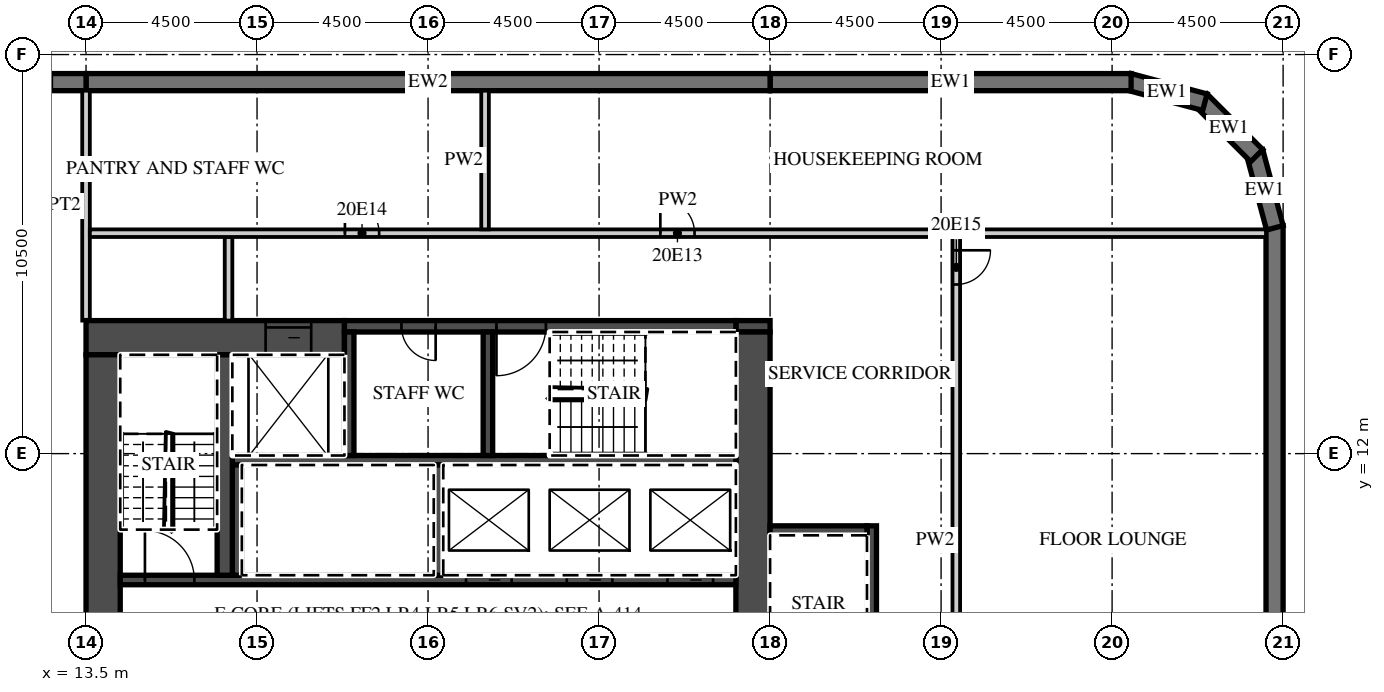
"""IFC4 building model, lengths in metres.
Left out: names, types, materials, properties, quantities, classifications, styles, units other than length and angle.
Written with IfcOpenShell. Run it as: python <this file> out.ifc"""

import sys

from ifc_helpers import new_model, si_unit, direction, frame, frame_2d, origin, place, context, subcontext, project, spatial, polyline, rectangle, outline, extrude, element, fill, save


model = new_model("IFC4")
c1 = context("Model", 3, precision=1e-05, world=origin(), true_north=direction((0.0, 1.0)))
c2 = subcontext(c1, "Body", "Model", "MODEL_VIEW")
j1 = project(units=[si_unit("LENGTHUNIT", "METRE"), si_unit("PLANEANGLEUNIT", "RADIAN")], contexts=[c1])
p1 = place(None, origin())
s1 = spatial("IfcSite", under=j1, at=p1, CompositionType="ELEMENT")
p2 = place(p1, origin())
s2 = spatial("IfcBuilding", under=s1, at=p2, CompositionType="ELEMENT")
p3 = place(p2, frame((0.0, 0.0, 96.3)))
s3 = spatial("IfcBuildingStorey", under=s2, at=p3, CompositionType="ELEMENT", Elevation=96.3)
p4 = place(p3, frame((44.775, -18.0, 0.0), z_axis=(0.0, 0.0, 1.0), x_axis=(0.0, 1.0, 0.0)))
e1 = element("IfcWall", 1, at=p4, inside=s3, PredefinedType="SOLIDWALL", context=c2, shape_type="SweptSolid", body=[
    extrude(rectangle(XDim=36.0, YDim=0.45, at=frame_2d((18.0, 0.0))), origin(), (0.0, 0.0, 1.0), 3.0),
])
p5 = place(p4, frame((3.9, 0.0, 0.45)))
e2 = element("IfcOpeningElement", 2, at=p5, cuts=e1, PredefinedType="OPENING", context=c2, shape_type="SweptSolid", body=[
    extrude(rectangle(XDim=3.3, YDim=2.25, at=frame_2d((1.65, 1.125))), frame((0.0, 0.235, 0.0), z_axis=(0.0, -1.0, 0.0), x_axis=(1.0, 0.0, 0.0)), (0.0, 0.0, 1.0), 0.47),
])
p6 = place(p4, frame((8.4, 0.0, 0.45)))
e3 = element("IfcOpeningElement", 3, at=p6, cuts=e1, PredefinedType="OPENING", context=c2, shape_type="SweptSolid", body=[
    extrude(rectangle(XDim=3.3, YDim=2.25, at=frame_2d((1.65, 1.125))), frame((0.0, 0.235, 0.0), z_axis=(0.0, -1.0, 0.0), x_axis=(1.0, 0.0, 0.0)), (0.0, 0.0, 1.0), 0.47),
])
p7 = place(p4, frame((12.9, 0.0, 0.45)))
e4 = element("IfcOpeningElement", 4, at=p7, cuts=e1, PredefinedType="OPENING", context=c2, shape_type="SweptSolid", body=[
    extrude(rectangle(XDim=3.3, YDim=2.25, at=frame_2d((1.65, 1.125))), frame((0.0, 0.235, 0.0), z_axis=(0.0, -1.0, 0.0), x_axis=(1.0, 0.0, 0.0)), (0.0, 0.0, 1.0), 0.47),
])
p8 = place(p3, frame((44.783, 17.942, 0.0), z_axis=(0.0, 0.0, 1.0), x_axis=(-0.25881466832, 0.965926999034, 0.0)))
e5 = element("IfcWall", 5, at=p8, inside=s3, PredefinedType="SOLIDWALL", context=c2, shape_type="SweptSolid", body=[
    extrude(outline(polyline([(0.0, -0.225), (2.071, -0.225), (1.95, 0.225), (0.121, 0.225), (0.0, -0.225)])), origin(), (0.0, 0.0, 1.0), 3.0),
])
p9 = place(p3, frame((44.305, 19.841, 0.0), z_axis=(0.0, 0.0, 1.0), x_axis=(-0.707106781187, 0.707106781187, 0.0)))
e6 = element("IfcWall", 6, at=p9, inside=s3, PredefinedType="SOLIDWALL", context=c2, shape_type="SweptSolid", body=[
    extrude(outline(polyline([(0.0, -0.225), (2.071, -0.225), (1.95, 0.225), (0.121, 0.225), (0.0, -0.225)])), origin(), (0.0, 0.0, 1.0), 3.0),
])
p10 = place(p3, frame((42.942, 21.247, 0.0), z_axis=(0.0, 0.0, 1.0), x_axis=(-0.965926999034, 0.25881466832, 0.0)))
e7 = element("IfcWall", 7, at=p10, inside=s3, PredefinedType="SOLIDWALL", context=c2, shape_type="SweptSolid", body=[
    extrude(outline(polyline([(-0.0, -0.225), (2.07, -0.225), (1.95, 0.225), (0.12, 0.225), (-0.0, -0.225)])), origin(), (0.0, 0.0, 1.0), 3.0),
])
p11 = place(p3, frame((41.0, 21.775, 0.0), z_axis=(0.0, 0.0, 1.0), x_axis=(-1.0, 0.0, 0.0)))
e8 = element("IfcWall", 8, at=p11, inside=s3, PredefinedType="SOLIDWALL", context=c2, shape_type="SweptSolid", body=[
    extrude(rectangle(XDim=9.5, YDim=0.45, at=frame_2d((4.75, 0.0))), origin(), (0.0, 0.0, 1.0), 3.0),
])
p12 = place(p3, frame((31.5, 21.775, 0.0), z_axis=(0.0, 0.0, 1.0), x_axis=(-1.0, 0.0, 0.0)))
e9 = element("IfcWall", 9, at=p12, inside=s3, PredefinedType="SOLIDWALL", context=c2, shape_type="SweptSolid", body=[
    extrude(rectangle(XDim=18.0, YDim=0.45, at=frame_2d((9.0, 0.0))), origin(), (0.0, 0.0, 1.0), 3.0),
])
p13 = place(p3, frame((13.5, 21.775, 0.0), z_axis=(0.0, 0.0, 1.0), x_axis=(-1.0, 0.0, 0.0)))
e10 = element("IfcWall", 10, at=p13, inside=s3, PredefinedType="SOLIDWALL", context=c2, shape_type="SweptSolid", body=[
    extrude(rectangle(XDim=54.5, YDim=0.45, at=frame_2d((27.25, 0.0))), origin(), (0.0, 0.0, 1.0), 3.0),
])
p14 = place(p13, frame((0.9, 0.0, 0.45)))
e11 = element("IfcOpeningElement", 11, at=p14, cuts=e10, PredefinedType="OPENING", context=c2, shape_type="SweptSolid", body=[
    extrude(rectangle(XDim=2.7, YDim=2.25, at=frame_2d((1.35, 1.125))), frame((0.0, 0.235, 0.0), z_axis=(0.0, -1.0, 0.0), x_axis=(1.0, 0.0, 0.0)), (0.0, 0.0, 1.0), 0.47),
])
p15 = place(p13, frame((5.4, 0.0, 0.45)))
e12 = element("IfcOpeningElement", 12, at=p15, cuts=e10, PredefinedType="OPENING", context=c2, shape_type="SweptSolid", body=[
    extrude(rectangle(XDim=2.7, YDim=2.25, at=frame_2d((1.35, 1.125))), frame((0.0, 0.235, 0.0), z_axis=(0.0, -1.0, 0.0), x_axis=(1.0, 0.0, 0.0)), (0.0, 0.0, 1.0), 0.47),
])
p16 = place(p13, frame((9.9, 0.0, 0.45)))
e13 = element("IfcOpeningElement", 13, at=p16, cuts=e10, PredefinedType="OPENING", context=c2, shape_type="SweptSolid", body=[
    extrude(rectangle(XDim=2.7, YDim=2.25, at=frame_2d((1.35, 1.125))), frame((0.0, 0.235, 0.0), z_axis=(0.0, -1.0, 0.0), x_axis=(1.0, 0.0, 0.0)), (0.0, 0.0, 1.0), 0.47),
])
p17 = place(p13, frame((14.4, 0.0, 0.45)))
e14 = element("IfcOpeningElement", 14, at=p17, cuts=e10, PredefinedType="OPENING", context=c2, shape_type="SweptSolid", body=[
    extrude(rectangle(XDim=2.7, YDim=2.25, at=frame_2d((1.35, 1.125))), frame((0.0, 0.235, 0.0), z_axis=(0.0, -1.0, 0.0), x_axis=(1.0, 0.0, 0.0)), (0.0, 0.0, 1.0), 0.47),
])
p18 = place(p13, frame((18.9, 0.0, 0.45)))
e15 = element("IfcOpeningElement", 15, at=p18, cuts=e10, PredefinedType="OPENING", context=c2, shape_type="SweptSolid", body=[
    extrude(rectangle(XDim=2.7, YDim=2.25, at=frame_2d((1.35, 1.125))), frame((0.0, 0.235, 0.0), z_axis=(0.0, -1.0, 0.0), x_axis=(1.0, 0.0, 0.0)), (0.0, 0.0, 1.0), 0.47),
])
p19 = place(p13, frame((23.4, 0.0, 0.45)))
e16 = element("IfcOpeningElement", 16, at=p19, cuts=e10, PredefinedType="OPENING", context=c2, shape_type="SweptSolid", body=[
    extrude(rectangle(XDim=2.7, YDim=2.25, at=frame_2d((1.35, 1.125))), frame((0.0, 0.235, 0.0), z_axis=(0.0, -1.0, 0.0), x_axis=(1.0, 0.0, 0.0)), (0.0, 0.0, 1.0), 0.47),
])
p20 = place(p13, frame((27.9, 0.0, 0.45)))
e17 = element("IfcOpeningElement", 17, at=p20, cuts=e10, PredefinedType="OPENING", context=c2, shape_type="SweptSolid", body=[
    extrude(rectangle(XDim=2.7, YDim=2.25, at=frame_2d((1.35, 1.125))), frame((0.0, 0.235, 0.0), z_axis=(0.0, -1.0, 0.0), x_axis=(1.0, 0.0, 0.0)), (0.0, 0.0, 1.0), 0.47),
])
p21 = place(p13, frame((32.4, 0.0, 0.45)))
e18 = element("IfcOpeningElement", 18, at=p21, cuts=e10, PredefinedType="OPENING", context=c2, shape_type="SweptSolid", body=[
    extrude(rectangle(XDim=2.7, YDim=2.25, at=frame_2d((1.35, 1.125))), frame((0.0, 0.235, 0.0), z_axis=(0.0, -1.0, 0.0), x_axis=(1.0, 0.0, 0.0)), (0.0, 0.0, 1.0), 0.47),
])
p22 = place(p13, frame((36.9, 0.0, 0.45)))
e19 = element("IfcOpeningElement", 19, at=p22, cuts=e10, PredefinedType="OPENING", context=c2, shape_type="SweptSolid", body=[
    extrude(rectangle(XDim=2.7, YDim=2.25, at=frame_2d((1.35, 1.125))), frame((0.0, 0.235, 0.0), z_axis=(0.0, -1.0, 0.0), x_axis=(1.0, 0.0, 0.0)), (0.0, 0.0, 1.0), 0.47),
])
p23 = place(p13, frame((41.4, 0.0, 0.45)))
e20 = element("IfcOpeningElement", 20, at=p23, cuts=e10, PredefinedType="OPENING", context=c2, shape_type="SweptSolid", body=[
    extrude(rectangle(XDim=2.7, YDim=2.25, at=frame_2d((1.35, 1.125))), frame((0.0, 0.235, 0.0), z_axis=(0.0, -1.0, 0.0), x_axis=(1.0, 0.0, 0.0)), (0.0, 0.0, 1.0), 0.47),
])
p24 = place(p13, frame((45.9, 0.0, 0.45)))
e21 = element("IfcOpeningElement", 21, at=p24, cuts=e10, PredefinedType="OPENING", context=c2, shape_type="SweptSolid", body=[
    extrude(rectangle(XDim=2.7, YDim=2.25, at=frame_2d((1.35, 1.125))), frame((0.0, 0.235, 0.0), z_axis=(0.0, -1.0, 0.0), x_axis=(1.0, 0.0, 0.0)), (0.0, 0.0, 1.0), 0.47),
])
p25 = place(p13, frame((50.4, 0.0, 0.45)))
e22 = element("IfcOpeningElement", 22, at=p25, cuts=e10, PredefinedType="OPENING", context=c2, shape_type="SweptSolid", body=[
    extrude(rectangle(XDim=2.7, YDim=2.25, at=frame_2d((1.35, 1.125))), frame((0.0, 0.235, 0.0), z_axis=(0.0, -1.0, 0.0), x_axis=(1.0, 0.0, 0.0)), (0.0, 0.0, 1.0), 0.47),
])
p26 = place(p3, frame((13.5, 15.5, 0.0), z_axis=(0.0, 0.0, 1.0), x_axis=(0.0, 1.0, 0.0)))
e23 = element("IfcWall", 23, at=p26, inside=s3, PredefinedType="PARTITIONING", context=c2, shape_type="SweptSolid", body=[
    extrude(rectangle(XDim=6.05, YDim=0.2, at=frame_2d((3.025, 0.0))), origin(), (0.0, 0.0, 1.0), 3.0),
])
p27 = place(p3, frame((13.5, 15.05, 0.0), z_axis=(0.0, 0.0, 1.0), x_axis=(1.0, 0.0, 0.0)))
e24 = element("IfcWall", 24, at=p27, inside=s3, PredefinedType="SHEAR", context=c2, shape_type="SweptSolid", body=[
    extrude(rectangle(XDim=6.8, YDim=0.9, at=frame_2d((3.4, 0.0))), origin(), (0.0, 0.0, 1.0), 3.0),
])
p28 = place(p27, frame((4.725, 0.0, 0.0)))
e25 = element("IfcOpeningElement", 25, at=p28, cuts=e24, PredefinedType="OPENING", context=c2, shape_type="SweptSolid", body=[
    extrude(rectangle(XDim=1.2, YDim=2.1, at=frame_2d((0.6, 1.05))), frame((0.0, 0.46, 0.0), z_axis=(0.0, -1.0, 0.0), x_axis=(1.0, 0.0, 0.0)), (0.0, 0.0, 1.0), 0.92),
])
p29 = place(p3, frame((30.6, 15.35, 0.0), z_axis=(0.0, 0.0, 1.0), x_axis=(1.0, 0.0, 0.0)))
e26 = element("IfcWall", 26, at=p29, inside=s3, PredefinedType="SHEAR", context=c2, shape_type="SweptSolid", body=[
    extrude(rectangle(XDim=0.9, YDim=0.3, at=frame_2d((0.45, 0.0))), origin(), (0.0, 0.0, 1.0), 3.0),
])
p30 = place(p3, frame((20.3, 15.35, 0.0), z_axis=(0.0, 0.0, 1.0), x_axis=(1.0, 0.0, 0.0)))
e27 = element("IfcWall", 27, at=p30, inside=s3, PredefinedType="SHEAR", context=c2, shape_type="SweptSolid", body=[
    extrude(rectangle(XDim=10.3, YDim=0.3, at=frame_2d((5.15, 0.0))), origin(), (0.0, 0.0, 1.0), 3.0),
])
p31 = place(p30, frame((4.0, 0.0, 0.0)))
e28 = element("IfcOpeningElement", 28, at=p31, cuts=e27, PredefinedType="OPENING", context=c2, shape_type="SweptSolid", body=[
    extrude(rectangle(XDim=1.3, YDim=2.1, at=frame_2d((0.65, 1.05))), frame((0.0, 0.16, 0.0), z_axis=(0.0, -1.0, 0.0), x_axis=(1.0, 0.0, 0.0)), (0.0, 0.0, 1.0), 0.32),
])
p32 = place(p30, frame((1.5, 0.0, 0.0)))
e29 = element("IfcOpeningElement", 29, at=p32, cuts=e27, PredefinedType="OPENING", context=c2, shape_type="SweptSolid", body=[
    extrude(rectangle(XDim=0.9, YDim=2.1, at=frame_2d((0.45, 1.05))), frame((0.0, 0.16, 0.0), z_axis=(0.0, -1.0, 0.0), x_axis=(1.0, 0.0, 0.0)), (0.0, 0.0, 1.0), 0.32),
])
p33 = place(p3, frame((31.05, 2.4, 0.0), z_axis=(0.0, 0.0, 1.0), x_axis=(0.0, 1.0, 0.0)))
e30 = element("IfcWall", 30, at=p33, inside=s3, PredefinedType="SHEAR", context=c2, shape_type="SweptSolid", body=[
    extrude(rectangle(XDim=12.8, YDim=0.9, at=frame_2d((6.4, 0.0))), origin(), (0.0, 0.0, 1.0), 3.0),
])
p34 = place(p33, frame((0.2, 0.0, 0.0)))
e31 = element("IfcOpeningElement", 31, at=p34, cuts=e30, PredefinedType="OPENING", context=c2, shape_type="SweptSolid", body=[
    extrude(rectangle(XDim=1.1, YDim=2.1, at=frame_2d((0.55, 1.05))), frame((0.0, 0.46, 0.0), z_axis=(0.0, -1.0, 0.0), x_axis=(1.0, 0.0, 0.0)), (0.0, 0.0, 1.0), 0.92),
])
p35 = place(p3, frame((13.95, 2.4, 0.0), z_axis=(0.0, 0.0, 1.0), x_axis=(0.0, 1.0, 0.0)))
e32 = element("IfcWall", 32, at=p35, inside=s3, PredefinedType="SHEAR", context=c2, shape_type="SweptSolid", body=[
    extrude(rectangle(XDim=12.2, YDim=0.9, at=frame_2d((6.1, 0.0))), origin(), (0.0, 0.0, 1.0), 3.0),
])
p36 = place(p3, frame((14.4, 8.675, 0.0), z_axis=(0.0, 0.0, 1.0), x_axis=(1.0, 0.0, 0.0)))
e33 = element("IfcWall", 33, at=p36, inside=s3, PredefinedType="SHEAR", context=c2, shape_type="SweptSolid", body=[
    extrude(rectangle(XDim=16.2, YDim=0.25, at=frame_2d((8.1, 0.0))), origin(), (0.0, 0.0, 1.0), 3.0),
])
p37 = place(p36, frame((14.4, 0.0, 0.0)))
e34 = element("IfcOpeningElement", 34, at=p37, cuts=e33, PredefinedType="OPENING", context=c2, shape_type="SweptSolid", body=[
    extrude(rectangle(XDim=1.2, YDim=2.1, at=frame_2d((0.6, 1.05))), frame((0.0, 0.135, 0.0), z_axis=(0.0, -1.0, 0.0), x_axis=(1.0, 0.0, 0.0)), (0.0, 0.0, 1.0), 0.27),
])
p38 = place(p36, frame((11.75, 0.0, 0.0)))
e35 = element("IfcOpeningElement", 35, at=p38, cuts=e33, PredefinedType="OPENING", context=c2, shape_type="SweptSolid", body=[
    extrude(rectangle(XDim=1.2, YDim=2.1, at=frame_2d((0.6, 1.05))), frame((0.0, 0.135, 0.0), z_axis=(0.0, -1.0, 0.0), x_axis=(1.0, 0.0, 0.0)), (0.0, 0.0, 1.0), 0.27),
])
p39 = place(p36, frame((9.1, 0.0, 0.0)))
e36 = element("IfcOpeningElement", 36, at=p39, cuts=e33, PredefinedType="OPENING", context=c2, shape_type="SweptSolid", body=[
    extrude(rectangle(XDim=1.2, YDim=2.1, at=frame_2d((0.6, 1.05))), frame((0.0, 0.135, 0.0), z_axis=(0.0, -1.0, 0.0), x_axis=(1.0, 0.0, 0.0)), (0.0, 0.0, 1.0), 0.27),
])
p40 = place(p36, frame((0.65, 0.0, 0.0)))
e37 = element("IfcOpeningElement", 37, at=p40, cuts=e33, PredefinedType="OPENING", context=c2, shape_type="SweptSolid", body=[
    extrude(rectangle(XDim=1.3, YDim=2.1, at=frame_2d((0.65, 1.05))), frame((0.0, 0.135, 0.0), z_axis=(0.0, -1.0, 0.0), x_axis=(1.0, 0.0, 0.0)), (0.0, 0.0, 1.0), 0.27),
])
p41 = place(p3, frame((17.35, 11.825, 0.0), z_axis=(0.0, 0.0, 1.0), x_axis=(1.0, 0.0, 0.0)))
e38 = element("IfcWall", 38, at=p41, inside=s3, PredefinedType="SHEAR", context=c2, shape_type="SweptSolid", body=[
    extrude(rectangle(XDim=13.25, YDim=0.25, at=frame_2d((6.625, 0.0))), origin(), (0.0, 0.0, 1.0), 3.0),
])
for number, where, z_axis, x_axis in (
    (39, (17.475, 8.8, 0.0), (0.0, 0.0, 1.0), (0.0, 1.0, 0.0)),
    (40, (22.775, 8.8, 0.0), (0.0, 0.0, 1.0), (0.0, 1.0, 0.0)),
):
    element("IfcWall", number, at=place(p3, frame(where, z_axis=z_axis, x_axis=x_axis)), inside=s3, PredefinedType="SHEAR", context=c2, shape_type="SweptSolid", body=[
        extrude(rectangle(XDim=2.9, YDim=0.25, at=frame_2d((1.45, 0.0))), origin(), (0.0, 0.0, 1.0), 3.0),
    ])
p42 = place(p3, frame((17.15, 8.8, 0.0), z_axis=(0.0, 0.0, 1.0), x_axis=(0.0, 1.0, 0.0)))
e41 = element("IfcWall", 41, at=p42, inside=s3, PredefinedType="SHEAR", context=c2, shape_type="SweptSolid", body=[
    extrude(rectangle(XDim=5.8, YDim=0.4, at=frame_2d((2.9, 0.0))), origin(), (0.0, 0.0, 1.0), 3.0),
])
for number, where, z_axis, x_axis in (
    (42, (20.425, 11.95, 0.0), (0.0, 0.0, 1.0), (0.0, 1.0, 0.0)),
    (43, (24.075, 11.95, 0.0), (0.0, 0.0, 1.0), (0.0, 1.0, 0.0)),
):
    element("IfcWall", number, at=place(p3, frame(where, z_axis=z_axis, x_axis=x_axis)), inside=s3, PredefinedType="SHEAR", context=c2, shape_type="SweptSolid", body=[
        extrude(rectangle(XDim=3.25, YDim=0.25, at=frame_2d((1.625, 0.0))), origin(), (0.0, 0.0, 1.0), 3.0),
    ])
p43 = place(p3, frame((34.175, 1.75, 0.0), z_axis=(0.0, 0.0, 1.0), x_axis=(0.0, 1.0, 0.0)))
e44 = element("IfcWall", 44, at=p43, inside=s3, PredefinedType="SHEAR", context=c2, shape_type="SweptSolid", body=[
    extrude(rectangle(XDim=8.35, YDim=0.25, at=frame_2d((4.175, 0.0))), origin(), (0.0, 0.0, 1.0), 3.0),
])
p44 = place(p3, frame((31.5, 9.975, 0.0), z_axis=(0.0, 0.0, 1.0), x_axis=(1.0, 0.0, 0.0)))
e45 = element("IfcWall", 45, at=p44, inside=s3, PredefinedType="SHEAR", context=c2, shape_type="SweptSolid", body=[
    extrude(rectangle(XDim=2.55, YDim=0.25, at=frame_2d((1.275, 0.0))), origin(), (0.0, 0.0, 1.0), 3.0),
])
p45 = place(p3, frame((17.25, 15.5, 0.0), z_axis=(0.0, 0.0, 1.0), x_axis=(0.0, 1.0, 0.0)))
e46 = element("IfcWall", 46, at=p45, inside=s3, PredefinedType="PARTITIONING", context=c2, shape_type="SweptSolid", body=[
    extrude(rectangle(XDim=2.2, YDim=0.2, at=frame_2d((1.1, 0.0))), origin(), (0.0, 0.0, 1.0), 3.0),
])
p46 = place(p3, frame((36.4, 1.75, 0.0), z_axis=(0.0, 0.0, 1.0), x_axis=(0.0, 1.0, 0.0)))
e47 = element("IfcWall", 47, at=p46, inside=s3, PredefinedType="PARTITIONING", context=c2, shape_type="SweptSolid", body=[
    extrude(rectangle(XDim=15.95, YDim=0.2, at=frame_2d((7.975, 0.0))), origin(), (0.0, 0.0, 1.0), 3.0),
])
p47 = place(p46, frame((14.7, 0.0, 0.0)))
e48 = element("IfcOpeningElement", 48, at=p47, cuts=e47, PredefinedType="OPENING", context=c2, shape_type="SweptSolid", body=[
    extrude(rectangle(XDim=0.9, YDim=2.1, at=frame_2d((0.45, 1.05))), frame((0.0, 0.11, 0.0), z_axis=(0.0, -1.0, 0.0), x_axis=(1.0, 0.0, 0.0)), (0.0, 0.0, 1.0), 0.22),
])
p48 = place(p3, frame((13.6, 17.8, 0.0), z_axis=(0.0, 0.0, 1.0), x_axis=(1.0, 0.0, 0.0)))
e49 = element("IfcWall", 49, at=p48, inside=s3, PredefinedType="PARTITIONING", context=c2, shape_type="SweptSolid", body=[
    extrude(rectangle(XDim=30.95, YDim=0.2, at=frame_2d((15.475, 0.0))), origin(), (0.0, 0.0, 1.0), 3.0),
])
p49 = place(p48, frame((15.012, 0.0, 0.0)))
e50 = element("IfcOpeningElement", 50, at=p49, cuts=e49, PredefinedType="OPENING", context=c2, shape_type="SweptSolid", body=[
    extrude(rectangle(XDim=0.9, YDim=2.1, at=frame_2d((0.45, 1.05))), frame((0.0, 0.11, 0.0), z_axis=(0.0, -1.0, 0.0), x_axis=(1.0, 0.0, 0.0)), (0.0, 0.0, 1.0), 0.22),
])
p50 = place(p48, frame((6.712, 0.0, 0.0)))
e51 = element("IfcOpeningElement", 51, at=p50, cuts=e49, PredefinedType="OPENING", context=c2, shape_type="SweptSolid", body=[
    extrude(rectangle(XDim=0.9, YDim=2.1, at=frame_2d((0.45, 1.05))), frame((0.0, 0.11, 0.0), z_axis=(0.0, -1.0, 0.0), x_axis=(1.0, 0.0, 0.0)), (0.0, 0.0, 1.0), 0.22),
])
p51 = place(p3, frame((24.0, 17.9, 0.0), z_axis=(0.0, 0.0, 1.0), x_axis=(0.0, 1.0, 0.0)))
e52 = element("IfcWall", 52, at=p51, inside=s3, PredefinedType="PARTITIONING", context=c2, shape_type="SweptSolid", body=[
    extrude(rectangle(XDim=3.65, YDim=0.2, at=frame_2d((1.825, 0.0))), origin(), (0.0, 0.0, 1.0), 3.0),
])
p52 = place(p37, origin())
e53 = element("IfcDoor", 53, at=p52, inside=s3, OperationType="SLIDING_TO_LEFT", PredefinedType="DOOR", context=c2, shape_type="SweptSolid", body=[
    extrude(rectangle(XDim=1.2, YDim=2.1, at=frame_2d((0.6, 1.05))), frame((0.0, 0.025, 0.0), z_axis=(0.0, -1.0, 0.0), x_axis=(1.0, 0.0, 0.0)), (0.0, 0.0, 1.0), 0.05),
])
fill(e34, e53)
p53 = place(p38, origin())
e54 = element("IfcDoor", 54, at=p53, inside=s3, OperationType="SLIDING_TO_RIGHT", PredefinedType="DOOR", context=c2, shape_type="SweptSolid", body=[
    extrude(rectangle(XDim=1.2, YDim=2.1, at=frame_2d((0.6, 1.05))), frame((0.0, 0.025, 0.0), z_axis=(0.0, -1.0, 0.0), x_axis=(1.0, 0.0, 0.0)), (0.0, 0.0, 1.0), 0.05),
])
fill(e35, e54)
p54 = place(p39, origin())
e55 = element("IfcDoor", 55, at=p54, inside=s3, OperationType="SLIDING_TO_RIGHT", PredefinedType="DOOR", context=c2, shape_type="SweptSolid", body=[
    extrude(rectangle(XDim=1.2, YDim=2.1, at=frame_2d((0.6, 1.05))), frame((0.0, 0.025, 0.0), z_axis=(0.0, -1.0, 0.0), x_axis=(1.0, 0.0, 0.0)), (0.0, 0.0, 1.0), 0.05),
])
fill(e36, e55)
p55 = place(p28, origin())
e56 = element("IfcDoor", 56, at=p55, inside=s3, OperationType="SLIDING_TO_LEFT", PredefinedType="DOOR", context=c2, shape_type="SweptSolid", body=[
    extrude(rectangle(XDim=1.2, YDim=2.1, at=frame_2d((0.6, 1.05))), frame((0.0, 0.025, 0.0), z_axis=(0.0, -1.0, 0.0), x_axis=(1.0, 0.0, 0.0)), (0.0, 0.0, 1.0), 0.05),
])
fill(e25, e56)
p56 = place(p40, origin())
e57 = element("IfcDoor", 57, at=p56, inside=s3, OperationType="SINGLE_SWING_LEFT", PredefinedType="DOOR", context=c2, shape_type="SweptSolid", body=[
    extrude(rectangle(XDim=1.3, YDim=2.1, at=frame_2d((0.65, 1.05))), frame((0.0, 0.025, 0.0), z_axis=(0.0, -1.0, 0.0), x_axis=(1.0, 0.0, 0.0)), (0.0, 0.0, 1.0), 0.05),
])
fill(e37, e57)
p57 = place(p31, origin())
e58 = element("IfcDoor", 58, at=p57, inside=s3, OperationType="SINGLE_SWING_LEFT", PredefinedType="DOOR", context=c2, shape_type="SweptSolid", body=[
    extrude(rectangle(XDim=1.3, YDim=2.1, at=frame_2d((0.65, 1.05))), frame((0.0, 0.025, 0.0), z_axis=(0.0, -1.0, 0.0), x_axis=(1.0, 0.0, 0.0)), (0.0, 0.0, 1.0), 0.05),
])
fill(e28, e58)
p58 = place(p32, origin())
e59 = element("IfcDoor", 59, at=p58, inside=s3, OperationType="SINGLE_SWING_RIGHT", PredefinedType="DOOR", context=c2, shape_type="SweptSolid", body=[
    extrude(rectangle(XDim=0.9, YDim=2.1, at=frame_2d((0.45, 1.05))), frame((0.0, 0.025, 0.0), z_axis=(0.0, -1.0, 0.0), x_axis=(1.0, 0.0, 0.0)), (0.0, 0.0, 1.0), 0.05),
])
fill(e29, e59)
p59 = place(p49, origin())
e60 = element("IfcDoor", 60, at=p59, inside=s3, OperationType="SINGLE_SWING_LEFT", PredefinedType="DOOR", context=c2, shape_type="SweptSolid", body=[
    extrude(rectangle(XDim=0.9, YDim=2.1, at=frame_2d((0.45, 1.05))), frame((0.0, 0.025, 0.0), z_axis=(0.0, -1.0, 0.0), x_axis=(1.0, 0.0, 0.0)), (0.0, 0.0, 1.0), 0.05),
])
fill(e50, e60)
p60 = place(p50, origin())
e61 = element("IfcDoor", 61, at=p60, inside=s3, OperationType="SINGLE_SWING_LEFT", PredefinedType="DOOR", context=c2, shape_type="SweptSolid", body=[
    extrude(rectangle(XDim=0.9, YDim=2.1, at=frame_2d((0.45, 1.05))), frame((0.0, 0.025, 0.0), z_axis=(0.0, -1.0, 0.0), x_axis=(1.0, 0.0, 0.0)), (0.0, 0.0, 1.0), 0.05),
])
fill(e51, e61)
p61 = place(p47, origin())
e62 = element("IfcDoor", 62, at=p61, inside=s3, OperationType="SINGLE_SWING_RIGHT", PredefinedType="DOOR", context=c2, shape_type="SweptSolid", body=[
    extrude(rectangle(XDim=0.9, YDim=2.1, at=frame_2d((0.45, 1.05))), frame((0.0, 0.025, 0.0), z_axis=(0.0, -1.0, 0.0), x_axis=(1.0, 0.0, 0.0)), (0.0, 0.0, 1.0), 0.05),
])
fill(e48, e62)
save(model, sys.argv[1])
